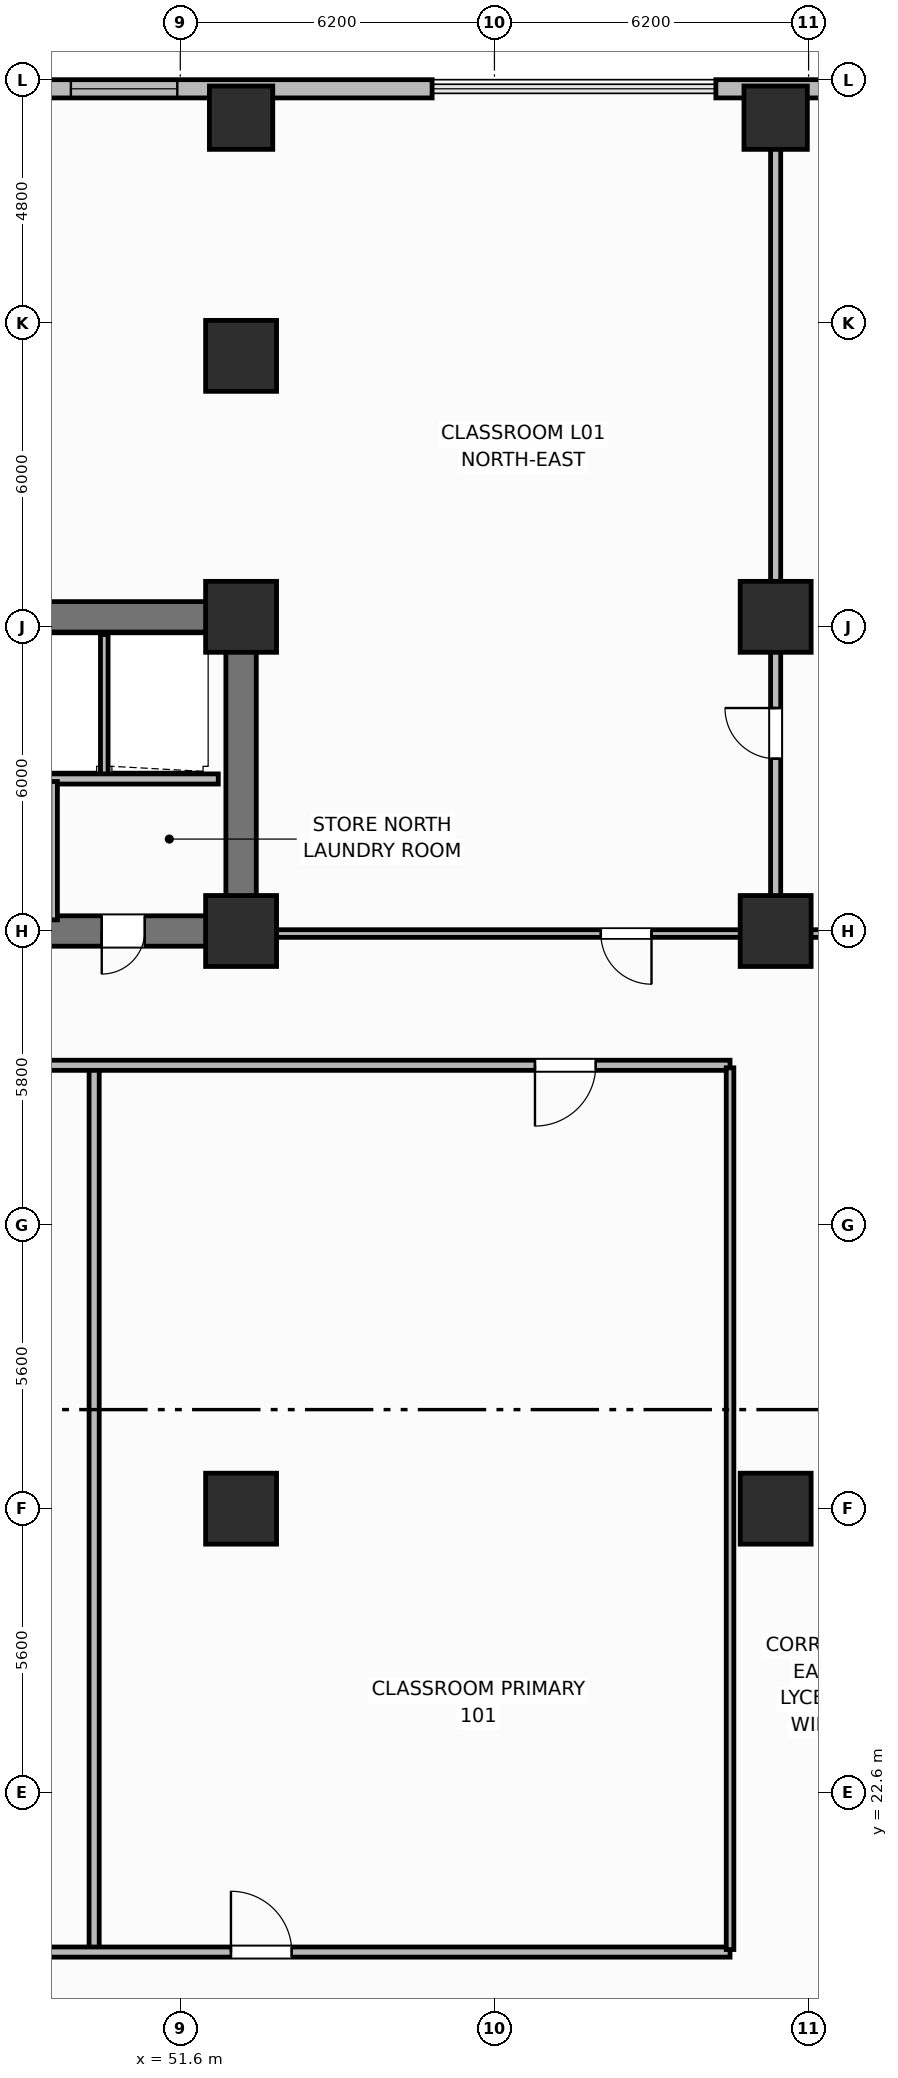
"""IFC4 building model, lengths in metres.
Left out: names, types, materials, properties, quantities, classifications, styles, units other than length and angle.
Written with IfcOpenShell. Run it as: python <this file> out.ifc"""

import sys

from ifc_helpers import new_model, si_unit, direction, frame, frame_2d, origin, origin_2d, place, context, subcontext, project, spatial, rectangle, extrude, element, fill, save


model = new_model("IFC4")
c1 = context("Model", 3, precision=1e-05, world=origin(), true_north=direction((0.0, 1.0)))
c2 = subcontext(c1, "Body", "Model", "MODEL_VIEW")
j1 = project(units=[si_unit("LENGTHUNIT", "METRE"), si_unit("PLANEANGLEUNIT", "RADIAN")], contexts=[c1])
p1 = place(None, origin())
s1 = spatial("IfcSite", under=j1, at=p1, CompositionType="ELEMENT")
p2 = place(p1, origin())
s2 = spatial("IfcBuilding", under=s1, at=p2, CompositionType="ELEMENT")
p3 = place(p2, frame((0.0, 0.0, 6.6)))
s3 = spatial("IfcBuildingStorey", under=s2, at=p3, CompositionType="ELEMENT", Elevation=6.6)
p4 = place(p3, frame((25.6, 45.8, 0.0), z_axis=(0.0, 0.0, 1.0), x_axis=(1.0, 0.0, 0.0)))
e1 = element("IfcWall", 1, at=p4, inside=s3, PredefinedType="SHEAR", context=c2, shape_type="SweptSolid", body=[
    extrude(rectangle(XDim=27.2, YDim=0.6, at=frame_2d((13.6, 0.0))), origin(), (0.0, 0.0, 1.0), 4.5),
])
p5 = place(p3, frame((52.8, 39.9, 0.0), z_axis=(0.0, 0.0, 1.0), x_axis=(0.0, 1.0, 0.0)))
e2 = element("IfcWall", 2, at=p5, inside=s3, PredefinedType="SHEAR", context=c2, shape_type="SweptSolid", body=[
    extrude(rectangle(XDim=5.6, YDim=0.6, at=frame_2d((2.8, 0.0))), origin(), (0.0, 0.0, 1.0), 4.5),
])
p6 = place(p3, frame((52.8, 39.6, 0.0), z_axis=(0.0, 0.0, 1.0), x_axis=(-1.0, 0.0, 0.0)))
e3 = element("IfcWall", 3, at=p6, inside=s3, PredefinedType="SHEAR", context=c2, shape_type="SweptSolid", body=[
    extrude(rectangle(XDim=27.2, YDim=0.6, at=frame_2d((13.6, 0.0))), origin(), (0.0, 0.0, 1.0), 4.5),
])
p7 = place(p6, frame((24.2, 0.0, 0.0)))
e4 = element("IfcOpeningElement", 4, at=p7, cuts=e3, PredefinedType="OPENING", context=c2, shape_type="SweptSolid", body=[
    extrude(rectangle(XDim=1.1, YDim=2.15, at=frame_2d((0.55, 1.075))), frame((0.0, 0.31, 0.0), z_axis=(0.0, -1.0, 0.0), x_axis=(1.0, 0.0, 0.0)), (0.0, 0.0, 1.0), 0.62),
])
p8 = place(p6, frame((20.55, 0.0, 0.0)))
e5 = element("IfcOpeningElement", 5, at=p8, cuts=e3, PredefinedType="OPENING", context=c2, shape_type="SweptSolid", body=[
    extrude(rectangle(XDim=0.95, YDim=2.1, at=frame_2d((0.475, 1.05))), frame((0.0, 0.31, 0.0), z_axis=(0.0, -1.0, 0.0), x_axis=(1.0, 0.0, 0.0)), (0.0, 0.0, 1.0), 0.62),
])
p9 = place(p6, frame((15.1, 0.0, 0.0)))
e6 = element("IfcOpeningElement", 6, at=p9, cuts=e3, PredefinedType="OPENING", context=c2, shape_type="SweptSolid", body=[
    extrude(rectangle(XDim=1.2, YDim=2.15, at=frame_2d((0.6, 1.075))), frame((0.0, 0.31, 0.0), z_axis=(0.0, -1.0, 0.0), x_axis=(1.0, 0.0, 0.0)), (0.0, 0.0, 1.0), 0.62),
])
p10 = place(p6, frame((11.6, 0.0, 0.0)))
e7 = element("IfcOpeningElement", 7, at=p10, cuts=e3, PredefinedType="OPENING", context=c2, shape_type="SweptSolid", body=[
    extrude(rectangle(XDim=0.9, YDim=2.1, at=frame_2d((0.45, 1.05))), frame((0.0, 0.31, 0.0), z_axis=(0.0, -1.0, 0.0), x_axis=(1.0, 0.0, 0.0)), (0.0, 0.0, 1.0), 0.62),
])
p11 = place(p6, frame((4.8, 0.0, 0.0)))
e8 = element("IfcOpeningElement", 8, at=p11, cuts=e3, PredefinedType="OPENING", context=c2, shape_type="SweptSolid", body=[
    extrude(rectangle(XDim=0.85, YDim=2.1, at=frame_2d((0.425, 1.05))), frame((0.0, 0.31, 0.0), z_axis=(0.0, -1.0, 0.0), x_axis=(1.0, 0.0, 0.0)), (0.0, 0.0, 1.0), 0.62),
])
p12 = place(p6, frame((1.9, 0.0, 0.0)))
e9 = element("IfcOpeningElement", 9, at=p12, cuts=e3, PredefinedType="OPENING", context=c2, shape_type="SweptSolid", body=[
    extrude(rectangle(XDim=0.85, YDim=2.1, at=frame_2d((0.425, 1.05))), frame((0.0, 0.31, 0.0), z_axis=(0.0, -1.0, 0.0), x_axis=(1.0, 0.0, 0.0)), (0.0, 0.0, 1.0), 0.62),
])
for number, where, z_axis, x_axis in (
    (10, (52.8, 39.6, 0.0), (0.0, 0.0, 1.0), (1.0, 0.0, 0.0)),
    (11, (52.8, 45.8, 0.0), (0.0, 0.0, 1.0), (1.0, 0.0, 0.0)),
    (12, (52.8, 28.2, 0.0), (0.0, 0.0, 1.0), (1.0, 0.0, 0.0)),
):
    element("IfcColumn", number, at=place(p3, frame(where, z_axis=z_axis, x_axis=x_axis)), inside=s3, PredefinedType="COLUMN", context=c2, shape_type="SweptSolid", body=[
        extrude(rectangle(XDim=1.4, YDim=1.4, at=origin_2d()), origin(), (0.0, 0.0, 1.0), 4.5),
    ])
for number, where, z_axis, x_axis in (
    (13, (52.8, 55.65, 0.0), (0.0, 0.0, 1.0), (1.0, 0.0, 0.0)),
    (14, (63.35, 55.65, 0.0), (0.0, 0.0, 1.0), (1.0, 0.0, 0.0)),
):
    element("IfcColumn", number, at=place(p3, frame(where, z_axis=z_axis, x_axis=x_axis)), inside=s3, PredefinedType="COLUMN", context=c2, shape_type="SweptSolid", body=[
        extrude(rectangle(XDim=1.25, YDim=1.25, at=origin_2d()), origin(), (0.0, 0.0, 1.0), 4.5),
    ])
for number, where, z_axis, x_axis in (
    (15, (52.8, 50.95, 0.0), (0.0, 0.0, 1.0), (1.0, 0.0, 0.0)),
    (16, (63.35, 28.2, 0.0), (0.0, 0.0, 1.0), (1.0, 0.0, 0.0)),
    (17, (63.35, 39.6, 0.0), (0.0, 0.0, 1.0), (1.0, 0.0, 0.0)),
    (18, (63.35, 45.8, 0.0), (0.0, 0.0, 1.0), (1.0, 0.0, 0.0)),
):
    element("IfcColumn", number, at=place(p3, frame(where, z_axis=z_axis, x_axis=x_axis)), inside=s3, PredefinedType="COLUMN", context=c2, shape_type="SweptSolid", body=[
        extrude(rectangle(XDim=1.4, YDim=1.4, at=origin_2d()), origin(), (0.0, 0.0, 1.0), 4.5),
    ])
p13 = place(p3, frame((77.42, 56.22, 0.0), z_axis=(0.0, 0.0, 1.0), x_axis=(-1.0, 0.0, 0.0)))
e19 = element("IfcWall", 19, at=p13, inside=s3, PredefinedType="SOLIDWALL", context=c2, shape_type="SweptSolid", body=[
    extrude(rectangle(XDim=15.25, YDim=0.36, at=frame_2d((7.625, 0.0))), origin(), (0.0, 0.0, 1.0), 3.48),
])
p14 = place(p13, frame((1.925, 0.0, 0.85)))
e20 = element("IfcOpeningElement", 20, at=p14, cuts=e19, PredefinedType="OPENING", context=c2, shape_type="SweptSolid", body=[
    extrude(rectangle(XDim=2.1, YDim=2.2, at=frame_2d((1.05, 1.1))), frame((0.0, 0.19, 0.0), z_axis=(0.0, -1.0, 0.0), x_axis=(1.0, 0.0, 0.0)), (0.0, 0.0, 1.0), 0.38),
])
p15 = place(p13, frame((7.625, 0.0, 0.85)))
e21 = element("IfcOpeningElement", 21, at=p15, cuts=e19, PredefinedType="OPENING", context=c2, shape_type="SweptSolid", body=[
    extrude(rectangle(XDim=2.1, YDim=2.2, at=frame_2d((1.05, 1.1))), frame((0.0, 0.19, 0.0), z_axis=(0.0, -1.0, 0.0), x_axis=(1.0, 0.0, 0.0)), (0.0, 0.0, 1.0), 0.38),
])
p16 = place(p13, frame((10.525, 0.0, 0.85)))
e22 = element("IfcOpeningElement", 22, at=p16, cuts=e19, PredefinedType="OPENING", context=c2, shape_type="SweptSolid", body=[
    extrude(rectangle(XDim=2.1, YDim=2.2, at=frame_2d((1.05, 1.1))), frame((0.0, 0.19, 0.0), z_axis=(0.0, -1.0, 0.0), x_axis=(1.0, 0.0, 0.0)), (0.0, 0.0, 1.0), 0.38),
])
p17 = place(p3, frame((56.57, 56.22, 0.0), z_axis=(0.0, 0.0, 1.0), x_axis=(-1.0, 0.0, 0.0)))
e23 = element("IfcWall", 23, at=p17, inside=s3, PredefinedType="SOLIDWALL", context=c2, shape_type="SweptSolid", body=[
    extrude(rectangle(XDim=55.59, YDim=0.36, at=frame_2d((27.795, 0.0))), origin(), (0.0, 0.0, 1.0), 3.48),
])
p18 = place(p17, frame((5.029, 0.0, 0.85)))
e24 = element("IfcOpeningElement", 24, at=p18, cuts=e23, PredefinedType="OPENING", context=c2, shape_type="SweptSolid", body=[
    extrude(rectangle(XDim=2.1, YDim=2.2, at=frame_2d((1.05, 1.1))), frame((0.0, 0.19, 0.0), z_axis=(0.0, -1.0, 0.0), x_axis=(1.0, 0.0, 0.0)), (0.0, 0.0, 1.0), 0.38),
])
p19 = place(p17, frame((8.648, 0.0, 0.85)))
e25 = element("IfcOpeningElement", 25, at=p19, cuts=e23, PredefinedType="OPENING", context=c2, shape_type="SweptSolid", body=[
    extrude(rectangle(XDim=2.1, YDim=2.2, at=frame_2d((1.05, 1.1))), frame((0.0, 0.19, 0.0), z_axis=(0.0, -1.0, 0.0), x_axis=(1.0, 0.0, 0.0)), (0.0, 0.0, 1.0), 0.38),
])
p20 = place(p17, frame((12.268, 0.0, 0.85)))
e26 = element("IfcOpeningElement", 26, at=p20, cuts=e23, PredefinedType="OPENING", context=c2, shape_type="SweptSolid", body=[
    extrude(rectangle(XDim=2.1, YDim=2.2, at=frame_2d((1.05, 1.1))), frame((0.0, 0.19, 0.0), z_axis=(0.0, -1.0, 0.0), x_axis=(1.0, 0.0, 0.0)), (0.0, 0.0, 1.0), 0.38),
])
p21 = place(p17, frame((19.506, 0.0, 0.85)))
e27 = element("IfcOpeningElement", 27, at=p21, cuts=e23, PredefinedType="OPENING", context=c2, shape_type="SweptSolid", body=[
    extrude(rectangle(XDim=2.1, YDim=2.2, at=frame_2d((1.05, 1.1))), frame((0.0, 0.19, 0.0), z_axis=(0.0, -1.0, 0.0), x_axis=(1.0, 0.0, 0.0)), (0.0, 0.0, 1.0), 0.38),
])
p22 = place(p17, frame((23.126, 0.0, 0.85)))
e28 = element("IfcOpeningElement", 28, at=p22, cuts=e23, PredefinedType="OPENING", context=c2, shape_type="SweptSolid", body=[
    extrude(rectangle(XDim=2.1, YDim=2.2, at=frame_2d((1.05, 1.1))), frame((0.0, 0.19, 0.0), z_axis=(0.0, -1.0, 0.0), x_axis=(1.0, 0.0, 0.0)), (0.0, 0.0, 1.0), 0.38),
])
p23 = place(p17, frame((26.745, 0.0, 0.85)))
e29 = element("IfcOpeningElement", 29, at=p23, cuts=e23, PredefinedType="OPENING", context=c2, shape_type="SweptSolid", body=[
    extrude(rectangle(XDim=2.1, YDim=2.2, at=frame_2d((1.05, 1.1))), frame((0.0, 0.19, 0.0), z_axis=(0.0, -1.0, 0.0), x_axis=(1.0, 0.0, 0.0)), (0.0, 0.0, 1.0), 0.38),
])
p24 = place(p17, frame((33.984, 0.0, 0.85)))
e30 = element("IfcOpeningElement", 30, at=p24, cuts=e23, PredefinedType="OPENING", context=c2, shape_type="SweptSolid", body=[
    extrude(rectangle(XDim=2.1, YDim=2.2, at=frame_2d((1.05, 1.1))), frame((0.0, 0.19, 0.0), z_axis=(0.0, -1.0, 0.0), x_axis=(1.0, 0.0, 0.0)), (0.0, 0.0, 1.0), 0.38),
])
p25 = place(p17, frame((37.603, 0.0, 0.85)))
e31 = element("IfcOpeningElement", 31, at=p25, cuts=e23, PredefinedType="OPENING", context=c2, shape_type="SweptSolid", body=[
    extrude(rectangle(XDim=2.1, YDim=2.2, at=frame_2d((1.05, 1.1))), frame((0.0, 0.19, 0.0), z_axis=(0.0, -1.0, 0.0), x_axis=(1.0, 0.0, 0.0)), (0.0, 0.0, 1.0), 0.38),
])
p26 = place(p17, frame((44.842, 0.0, 0.85)))
e32 = element("IfcOpeningElement", 32, at=p26, cuts=e23, PredefinedType="OPENING", context=c2, shape_type="SweptSolid", body=[
    extrude(rectangle(XDim=2.1, YDim=2.2, at=frame_2d((1.05, 1.1))), frame((0.0, 0.19, 0.0), z_axis=(0.0, -1.0, 0.0), x_axis=(1.0, 0.0, 0.0)), (0.0, 0.0, 1.0), 0.38),
])
p27 = place(p17, frame((52.08, 0.0, 0.85)))
e33 = element("IfcOpeningElement", 33, at=p27, cuts=e23, PredefinedType="OPENING", context=c2, shape_type="SweptSolid", body=[
    extrude(rectangle(XDim=2.1, YDim=2.2, at=frame_2d((1.05, 1.1))), frame((0.0, 0.19, 0.0), z_axis=(0.0, -1.0, 0.0), x_axis=(1.0, 0.0, 0.0)), (0.0, 0.0, 1.0), 0.38),
])
p28 = place(p3, frame((50.1, 42.65, 0.0), z_axis=(0.0, 0.0, 1.0), x_axis=(0.0, 1.0, 0.0)))
e34 = element("IfcWall", 34, at=p28, inside=s3, PredefinedType="PARTITIONING", context=c2, shape_type="SweptSolid", body=[
    extrude(rectangle(XDim=2.8, YDim=0.15, at=frame_2d((1.4, 0.0))), origin(), (0.0, 0.0, 1.0), 3.42),
])
p29 = place(p3, frame((52.35, 42.6, 0.0), z_axis=(0.0, 0.0, 1.0), x_axis=(-1.0, 0.0, 0.0)))
e35 = element("IfcWall", 35, at=p29, inside=s3, PredefinedType="PARTITIONING", context=c2, shape_type="SweptSolid", body=[
    extrude(rectangle(XDim=8.8, YDim=0.2, at=frame_2d((4.4, 0.0))), origin(), (0.0, 0.0, 1.0), 3.42),
])
p30 = place(p3, frame((49.1, 39.82, 0.0), z_axis=(0.0, 0.0, 1.0), x_axis=(0.0, 1.0, 0.0)))
e36 = element("IfcWall", 36, at=p30, inside=s3, PredefinedType="PARTITIONING", context=c2, shape_type="SweptSolid", body=[
    extrude(rectangle(XDim=2.73, YDim=0.15, at=frame_2d((1.365, 0.0))), origin(), (0.0, 0.0, 1.0), 3.42),
])
p31 = place(p3, frame((49.9, 19.5, 0.0), z_axis=(0.0, 0.0, 1.0), x_axis=(0.0, 1.0, 0.0)))
e37 = element("IfcWall", 37, at=p31, inside=s3, PredefinedType="PARTITIONING", context=c2, shape_type="SweptSolid", body=[
    extrude(rectangle(XDim=17.4, YDim=0.2, at=frame_2d((8.7, 0.0))), origin(), (0.0, 0.0, 1.0), 3.42),
])
p32 = place(p3, frame((15.95, 19.45, 0.0), z_axis=(0.0, 0.0, 1.0), x_axis=(1.0, 0.0, 0.0)))
e38 = element("IfcWall", 38, at=p32, inside=s3, PredefinedType="PARTITIONING", context=c2, shape_type="SweptSolid", body=[
    extrude(rectangle(XDim=46.5, YDim=0.2, at=frame_2d((23.25, 0.0))), origin(), (0.0, 0.0, 1.0), 3.42),
])
p33 = place(p32, frame((2.65, 0.0, 0.0)))
e39 = element("IfcOpeningElement", 39, at=p33, cuts=e38, PredefinedType="OPENING", context=c2, shape_type="SweptSolid", body=[
    extrude(rectangle(XDim=1.2, YDim=2.15, at=frame_2d((0.6, 1.075))), frame((0.0, 0.11, 0.0), z_axis=(0.0, -1.0, 0.0), x_axis=(1.0, 0.0, 0.0)), (0.0, 0.0, 1.0), 0.22),
])
p34 = place(p32, frame((22.85, 0.0, 0.0)))
e40 = element("IfcOpeningElement", 40, at=p34, cuts=e38, PredefinedType="OPENING", context=c2, shape_type="SweptSolid", body=[
    extrude(rectangle(XDim=1.2, YDim=2.15, at=frame_2d((0.6, 1.075))), frame((0.0, 0.11, 0.0), z_axis=(0.0, -1.0, 0.0), x_axis=(1.0, 0.0, 0.0)), (0.0, 0.0, 1.0), 0.22),
])
p35 = place(p32, frame((36.65, 0.0, 0.0)))
e41 = element("IfcOpeningElement", 41, at=p35, cuts=e38, PredefinedType="OPENING", context=c2, shape_type="SweptSolid", body=[
    extrude(rectangle(XDim=1.2, YDim=2.15, at=frame_2d((0.6, 1.075))), frame((0.0, 0.11, 0.0), z_axis=(0.0, -1.0, 0.0), x_axis=(1.0, 0.0, 0.0)), (0.0, 0.0, 1.0), 0.22),
])
p36 = place(p3, frame((62.45, 36.95, 0.0), z_axis=(0.0, 0.0, 1.0), x_axis=(-1.0, 0.0, 0.0)))
e42 = element("IfcWall", 42, at=p36, inside=s3, PredefinedType="PARTITIONING", context=c2, shape_type="SweptSolid", body=[
    extrude(rectangle(XDim=46.5, YDim=0.2, at=frame_2d((23.25, 0.0))), origin(), (0.0, 0.0, 1.0), 3.42),
])
p37 = place(p36, frame((29.05, 0.0, 0.0)))
e43 = element("IfcOpeningElement", 43, at=p37, cuts=e42, PredefinedType="OPENING", context=c2, shape_type="SweptSolid", body=[
    extrude(rectangle(XDim=1.2, YDim=2.15, at=frame_2d((0.6, 1.075))), frame((0.0, 0.11, 0.0), z_axis=(0.0, -1.0, 0.0), x_axis=(1.0, 0.0, 0.0)), (0.0, 0.0, 1.0), 0.22),
])
p38 = place(p36, frame((15.25, 0.0, 0.0)))
e44 = element("IfcOpeningElement", 44, at=p38, cuts=e42, PredefinedType="OPENING", context=c2, shape_type="SweptSolid", body=[
    extrude(rectangle(XDim=1.2, YDim=2.15, at=frame_2d((0.6, 1.075))), frame((0.0, 0.11, 0.0), z_axis=(0.0, -1.0, 0.0), x_axis=(1.0, 0.0, 0.0)), (0.0, 0.0, 1.0), 0.22),
])
p39 = place(p36, frame((2.65, 0.0, 0.0)))
e45 = element("IfcOpeningElement", 45, at=p39, cuts=e42, PredefinedType="OPENING", context=c2, shape_type="SweptSolid", body=[
    extrude(rectangle(XDim=1.2, YDim=2.15, at=frame_2d((0.6, 1.075))), frame((0.0, 0.11, 0.0), z_axis=(0.0, -1.0, 0.0), x_axis=(1.0, 0.0, 0.0)), (0.0, 0.0, 1.0), 0.22),
])
p40 = place(p3, frame((62.45, 19.5, 0.0), z_axis=(0.0, 0.0, 1.0), x_axis=(0.0, 1.0, 0.0)))
e46 = element("IfcWall", 46, at=p40, inside=s3, PredefinedType="PARTITIONING", context=c2, shape_type="SweptSolid", body=[
    extrude(rectangle(XDim=17.4, YDim=0.15, at=frame_2d((8.7, 0.0))), origin(), (0.0, 0.0, 1.0), 3.42),
])
p41 = place(p3, frame((63.35, 39.6, 0.0), z_axis=(0.0, 0.0, 1.0), x_axis=(0.0, 1.0, 0.0)))
e47 = element("IfcWall", 47, at=p41, inside=s3, PredefinedType="PARTITIONING", context=c2, shape_type="SweptSolid", body=[
    extrude(rectangle(XDim=16.4, YDim=0.2, at=frame_2d((8.2, 0.0))), origin(), (0.0, 0.0, 1.0), 3.42),
])
p42 = place(p41, frame((3.4, 0.0, 0.0)))
e48 = element("IfcOpeningElement", 48, at=p42, cuts=e47, PredefinedType="OPENING", context=c2, shape_type="SweptSolid", body=[
    extrude(rectangle(XDim=1.0, YDim=2.15, at=frame_2d((0.5, 1.075))), frame((0.0, 0.11, 0.0), z_axis=(0.0, -1.0, 0.0), x_axis=(1.0, 0.0, 0.0)), (0.0, 0.0, 1.0), 0.22),
])
p43 = place(p3, frame((66.4, 39.55, 0.0), z_axis=(0.0, 0.0, 1.0), x_axis=(-1.0, 0.0, 0.0)))
e49 = element("IfcWall", 49, at=p43, inside=s3, PredefinedType="PARTITIONING", context=c2, shape_type="SweptSolid", body=[
    extrude(rectangle(XDim=13.25, YDim=0.15, at=frame_2d((6.625, 0.0))), origin(), (0.0, 0.0, 1.0), 3.42),
])
p44 = place(p43, frame((5.5, 0.0, 0.0)))
e50 = element("IfcOpeningElement", 50, at=p44, cuts=e49, PredefinedType="OPENING", context=c2, shape_type="SweptSolid", body=[
    extrude(rectangle(XDim=1.0, YDim=2.15, at=frame_2d((0.5, 1.075))), frame((0.0, 0.085, 0.0), z_axis=(0.0, -1.0, 0.0), x_axis=(1.0, 0.0, 0.0)), (0.0, 0.0, 1.0), 0.17),
])
p45 = place(p18, origin())
e51 = element("IfcWindow", 51, at=p45, inside=s3, PartitioningType="SINGLE_PANEL", PredefinedType="WINDOW", context=c2, shape_type="SweptSolid", body=[
    extrude(rectangle(XDim=2.1, YDim=2.2, at=frame_2d((1.05, 1.1))), frame((0.0, 0.03, 0.0), z_axis=(0.0, -1.0, 0.0), x_axis=(1.0, 0.0, 0.0)), (0.0, 0.0, 1.0), 0.06),
])
fill(e24, e51)
p46 = place(p35, origin())
e52 = element("IfcDoor", 52, at=p46, inside=s3, OperationType="SINGLE_SWING_LEFT", PredefinedType="DOOR", context=c2, shape_type="SweptSolid", body=[
    extrude(rectangle(XDim=1.2, YDim=2.15, at=frame_2d((0.6, 1.075))), frame((0.0, 0.025, 0.0), z_axis=(0.0, -1.0, 0.0), x_axis=(1.0, 0.0, 0.0)), (0.0, 0.0, 1.0), 0.05),
])
fill(e41, e52)
p47 = place(p39, origin())
e53 = element("IfcDoor", 53, at=p47, inside=s3, OperationType="SINGLE_SWING_RIGHT", PredefinedType="DOOR", context=c2, shape_type="SweptSolid", body=[
    extrude(rectangle(XDim=1.2, YDim=2.15, at=frame_2d((0.6, 1.075))), frame((0.0, 0.025, 0.0), z_axis=(0.0, -1.0, 0.0), x_axis=(1.0, 0.0, 0.0)), (0.0, 0.0, 1.0), 0.05),
])
fill(e45, e53)
p48 = place(p42, origin())
e54 = element("IfcDoor", 54, at=p48, inside=s3, OperationType="SINGLE_SWING_RIGHT", PredefinedType="DOOR", context=c2, shape_type="SweptSolid", body=[
    extrude(rectangle(XDim=1.0, YDim=2.15, at=frame_2d((0.5, 1.075))), frame((0.0, 0.025, 0.0), z_axis=(0.0, -1.0, 0.0), x_axis=(1.0, 0.0, 0.0)), (0.0, 0.0, 1.0), 0.05),
])
fill(e48, e54)
p49 = place(p44, origin())
e55 = element("IfcDoor", 55, at=p49, inside=s3, OperationType="SINGLE_SWING_LEFT", PredefinedType="DOOR", context=c2, shape_type="SweptSolid", body=[
    extrude(rectangle(XDim=1.0, YDim=2.15, at=frame_2d((0.5, 1.075))), frame((0.0, 0.025, 0.0), z_axis=(0.0, -1.0, 0.0), x_axis=(1.0, 0.0, 0.0)), (0.0, 0.0, 1.0), 0.05),
])
fill(e50, e55)
p50 = place(p12, origin())
e56 = element("IfcDoor", 56, at=p50, inside=s3, OperationType="SINGLE_SWING_RIGHT", PredefinedType="DOOR", context=c2, shape_type="SweptSolid", body=[
    extrude(rectangle(XDim=0.85, YDim=2.1, at=frame_2d((0.425, 1.05))), frame((0.0, 0.025, 0.0), z_axis=(0.0, -1.0, 0.0), x_axis=(1.0, 0.0, 0.0)), (0.0, 0.0, 1.0), 0.05),
])
fill(e9, e56)
save(model, sys.argv[1])
